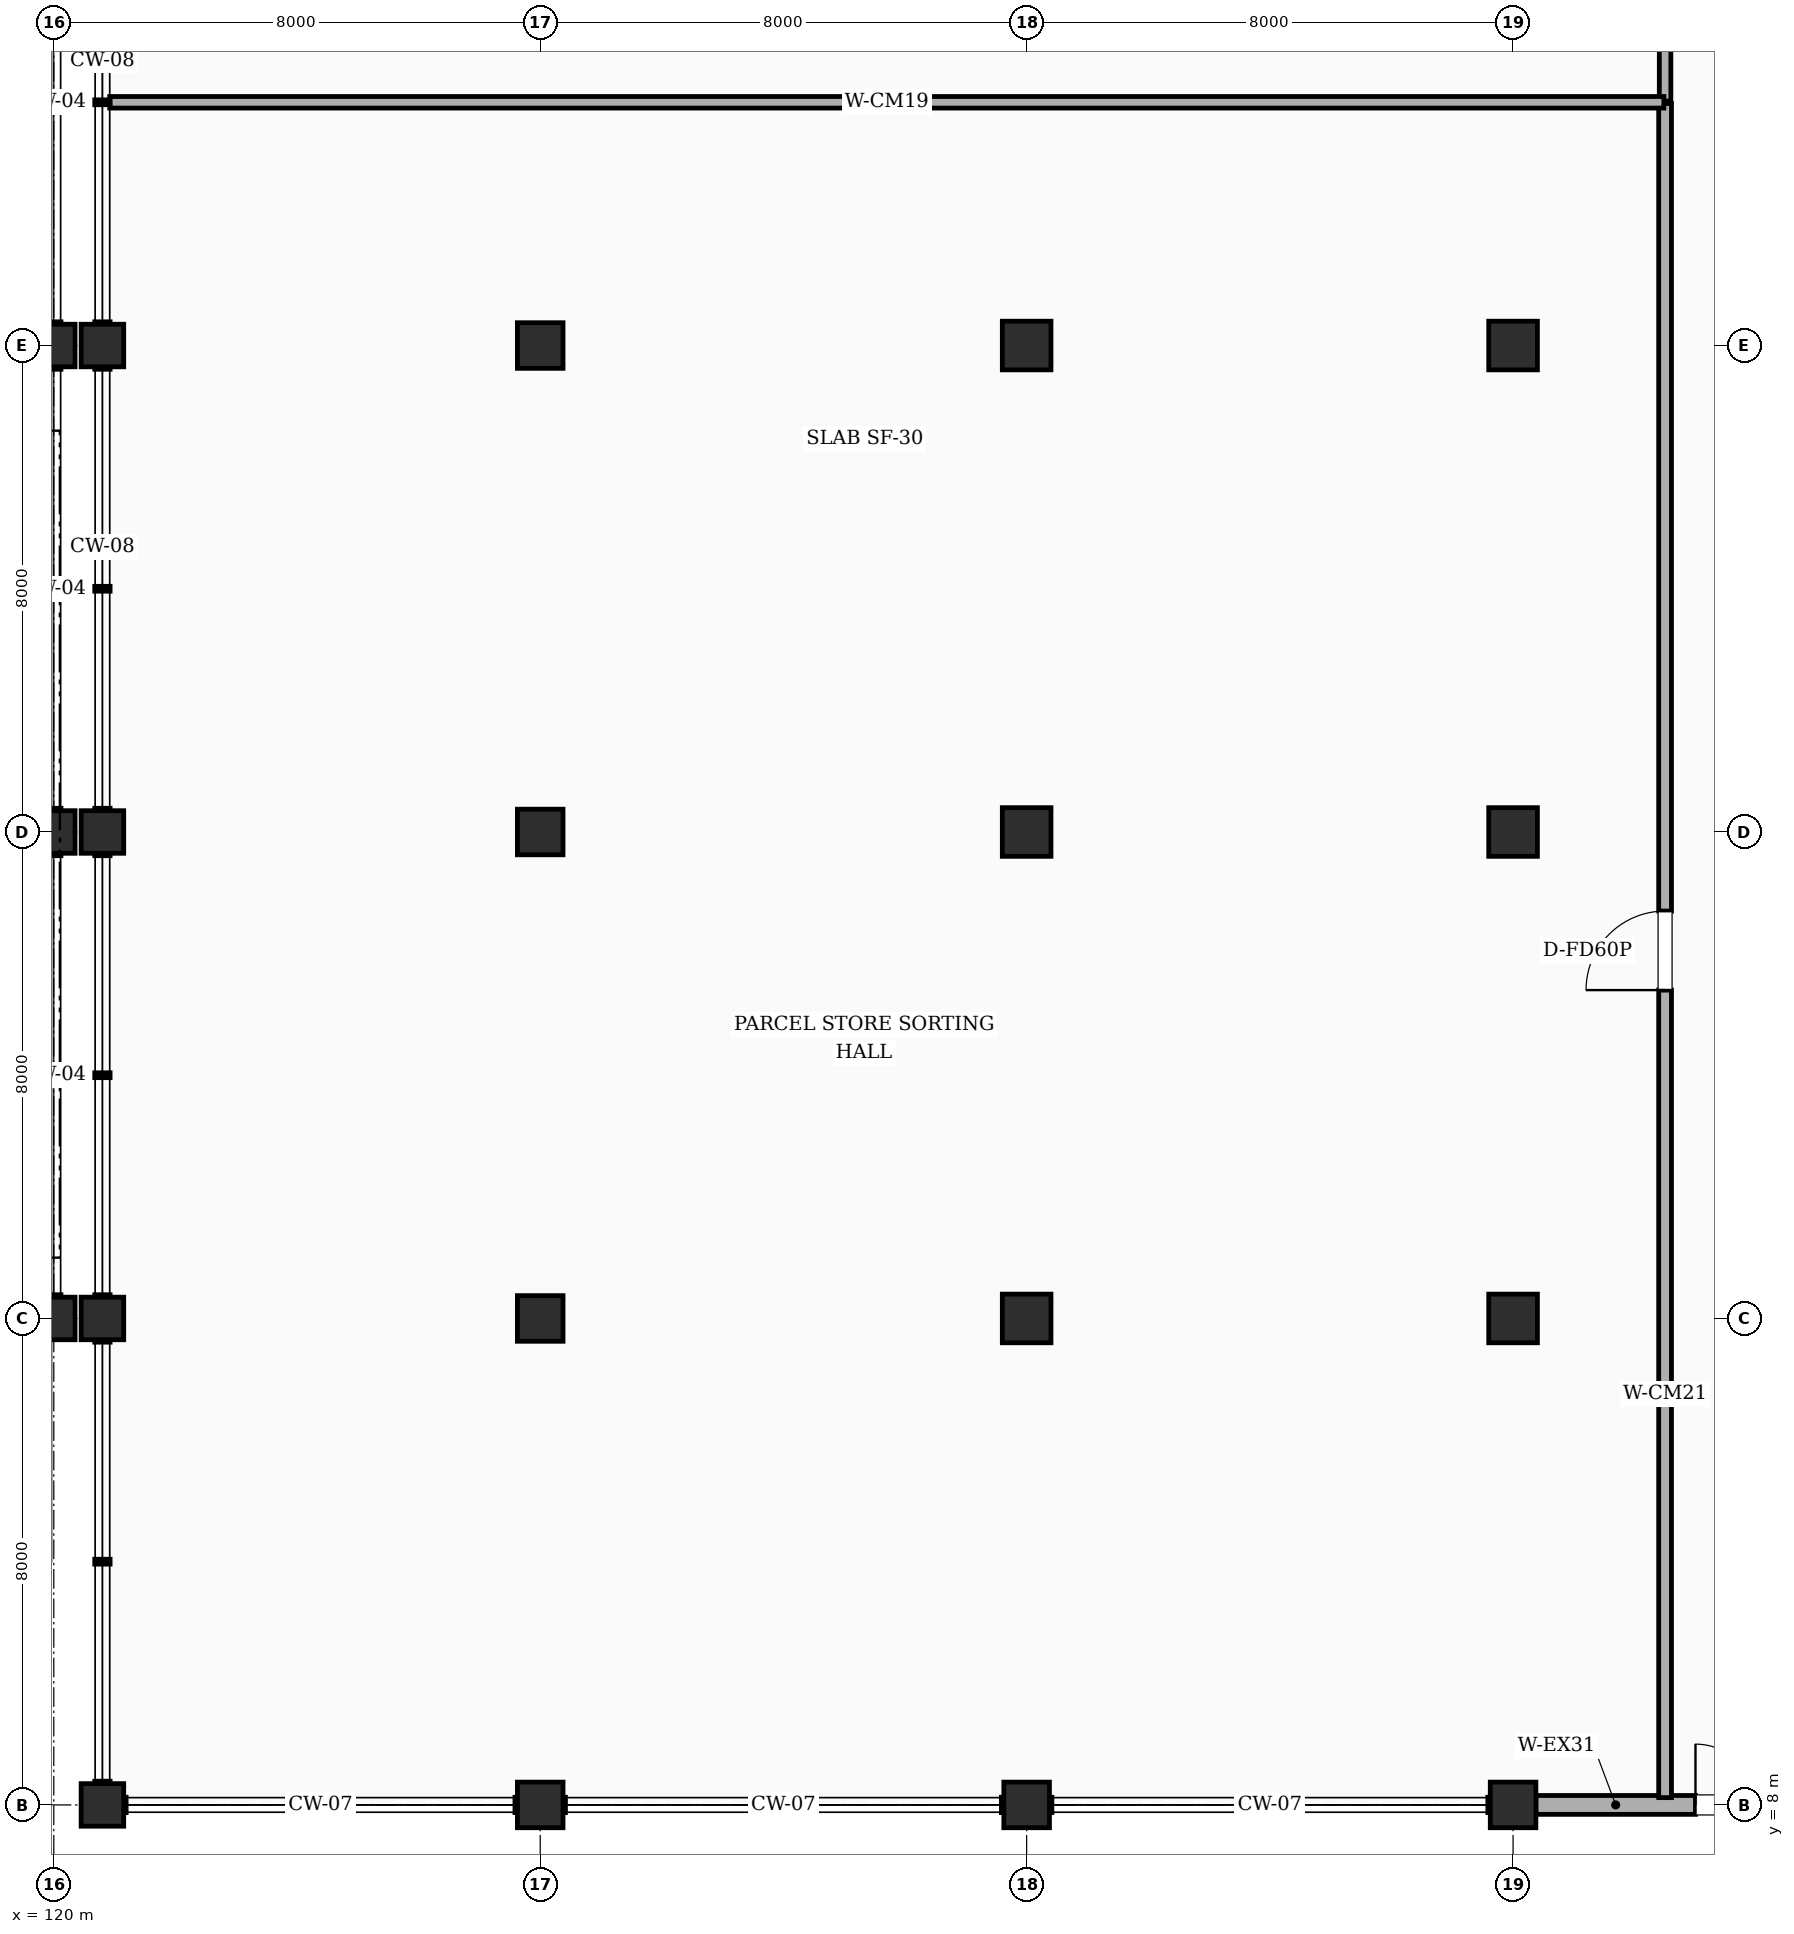
"""IFC4 building model, lengths in metres.
Left out: names, types, materials, properties, quantities, classifications, styles, units other than length and angle.
Written with IfcOpenShell. Run it as: python <this file> out.ifc"""

import sys

from ifc_helpers import new_model, si_unit, direction, frame, frame_2d, origin, origin_2d, place, context, subcontext, project, spatial, rectangle, extrude, element, fill, save


model = new_model("IFC4")
c1 = context("Model", 3, precision=1e-05, world=origin(), true_north=direction((0.0, 1.0)))
c2 = subcontext(c1, "Body", "Model", "MODEL_VIEW")
j1 = project(units=[si_unit("LENGTHUNIT", "METRE"), si_unit("PLANEANGLEUNIT", "RADIAN")], contexts=[c1])
p1 = place(None, origin())
s1 = spatial("IfcSite", under=j1, at=p1, CompositionType="ELEMENT")
p2 = place(p1, origin())
s2 = spatial("IfcBuilding", under=s1, at=p2, CompositionType="ELEMENT")
p3 = place(p2, origin())
s3 = spatial("IfcBuildingStorey", under=s2, at=p3, CompositionType="ELEMENT", Elevation=0.0)
for number, where, z_axis, x_axis in (
    (1, (120.0, 16.0, 0.0), (0.0, 0.0, 1.0), (1.0, 0.0, 0.0)),
    (2, (120.0, 24.0, 0.0), (0.0, 0.0, 1.0), (1.0, 0.0, 0.0)),
    (3, (120.0, 32.0, 0.0), (0.0, 0.0, 1.0), (1.0, 0.0, 0.0)),
    (4, (120.8, 8.0, 0.0), (0.0, 0.0, 1.0), (1.0, 0.0, 0.0)),
    (5, (120.8, 16.0, 0.0), (0.0, 0.0, 1.0), (1.0, 0.0, 0.0)),
    (6, (120.8, 24.0, 0.0), (0.0, 0.0, 1.0), (1.0, 0.0, 0.0)),
    (7, (120.8, 32.0, 0.0), (0.0, 0.0, 1.0), (1.0, 0.0, 0.0)),
):
    element("IfcColumn", number, at=place(p3, frame(where, z_axis=z_axis, x_axis=x_axis)), inside=s3, PredefinedType="COLUMN", context=c2, shape_type="SweptSolid", body=[
        extrude(rectangle(XDim=0.7, YDim=0.7, at=origin_2d()), origin(), (0.0, 0.0, 1.0), 5.4),
    ])
for number, where, z_axis, x_axis in (
    (8, (128.0, 8.0, 0.0), (0.0, 0.0, 1.0), (1.0, 0.0, 0.0)),
    (9, (128.0, 16.0, 0.0), (0.0, 0.0, 1.0), (1.0, 0.0, 0.0)),
    (10, (128.0, 24.0, 0.0), (0.0, 0.0, 1.0), (1.0, 0.0, 0.0)),
    (11, (128.0, 32.0, 0.0), (0.0, 0.0, 1.0), (1.0, 0.0, 0.0)),
    (12, (136.0, 8.0, 0.0), (0.0, 0.0, 1.0), (1.0, 0.0, 0.0)),
):
    element("IfcColumn", number, at=place(p3, frame(where, z_axis=z_axis, x_axis=x_axis)), inside=s3, PredefinedType="COLUMN", context=c2, shape_type="SweptSolid", body=[
        extrude(rectangle(XDim=0.75, YDim=0.75, at=origin_2d()), origin(), (0.0, 0.0, 1.0), 5.4),
    ])
for number, where, z_axis, x_axis in (
    (13, (136.0, 16.0, 0.0), (0.0, 0.0, 1.0), (1.0, 0.0, 0.0)),
    (14, (136.0, 24.0, 0.0), (0.0, 0.0, 1.0), (1.0, 0.0, 0.0)),
    (15, (136.0, 32.0, 0.0), (0.0, 0.0, 1.0), (1.0, 0.0, 0.0)),
):
    element("IfcColumn", number, at=place(p3, frame(where, z_axis=z_axis, x_axis=x_axis)), inside=s3, PredefinedType="COLUMN", context=c2, shape_type="SweptSolid", body=[
        extrude(rectangle(XDim=0.8, YDim=0.8, at=origin_2d()), origin(), (0.0, 0.0, 1.0), 5.4),
    ])
p4 = place(p3, frame((144.0, 8.0, 0.0), z_axis=(0.0, 0.0, 1.0), x_axis=(1.0, 0.0, 0.0)))
e16 = element("IfcColumn", 16, at=p4, inside=s3, PredefinedType="COLUMN", context=c2, shape_type="SweptSolid", body=[
    extrude(rectangle(XDim=0.75, YDim=0.75, at=origin_2d()), origin(), (0.0, 0.0, 1.0), 5.4),
])
for number, where, z_axis, x_axis in (
    (17, (144.0, 16.0, 0.0), (0.0, 0.0, 1.0), (1.0, 0.0, 0.0)),
    (18, (144.0, 24.0, 0.0), (0.0, 0.0, 1.0), (1.0, 0.0, 0.0)),
    (19, (144.0, 32.0, 0.0), (0.0, 0.0, 1.0), (1.0, 0.0, 0.0)),
):
    element("IfcColumn", number, at=place(p3, frame(where, z_axis=z_axis, x_axis=x_axis)), inside=s3, PredefinedType="COLUMN", context=c2, shape_type="SweptSolid", body=[
        extrude(rectangle(XDim=0.8, YDim=0.8, at=origin_2d()), origin(), (0.0, 0.0, 1.0), 5.4),
    ])
p5 = place(p3, frame((144.375, 8.0, 0.0), z_axis=(0.0, 0.0, 1.0), x_axis=(1.0, 0.0, 0.0)))
e20 = element("IfcWall", 20, at=p5, inside=s3, PredefinedType="STANDARD", context=c2, shape_type="SweptSolid", body=[
    extrude(rectangle(XDim=7.25, YDim=0.31, at=frame_2d((3.625, 0.0))), origin(), (0.0, 0.0, 1.0), 5.1),
])
p6 = place(p5, frame((2.625, 0.0, 0.0)))
e21 = element("IfcOpeningElement", 21, at=p6, cuts=e20, PredefinedType="OPENING", context=c2, shape_type="SweptSolid", body=[
    extrude(rectangle(XDim=2.0, YDim=2.4, at=frame_2d((1.0, 1.2))), frame((0.0, 0.165, 0.0), z_axis=(0.0, -1.0, 0.0), x_axis=(1.0, 0.0, 0.0)), (0.0, 0.0, 1.0), 0.33),
])
p7 = place(p3, frame((146.5, 8.12, 0.0), z_axis=(0.0, 0.0, 1.0), x_axis=(0.0, 1.0, 0.0)))
e22 = element("IfcWall", 22, at=p7, inside=s3, PredefinedType="SOLIDWALL", context=c2, shape_type="SweptSolid", body=[
    extrude(rectangle(XDim=27.86, YDim=0.21, at=frame_2d((13.93, 0.0))), origin(), (0.0, 0.0, 1.0), 5.1),
])
p8 = place(p7, frame((13.28, 0.0, 0.0)))
e23 = element("IfcOpeningElement", 23, at=p8, cuts=e22, PredefinedType="OPENING", context=c2, shape_type="SweptSolid", body=[
    extrude(rectangle(XDim=1.3, YDim=2.2, at=frame_2d((0.65, 1.1))), frame((0.0, 0.115, 0.0), z_axis=(0.0, -1.0, 0.0), x_axis=(1.0, 0.0, 0.0)), (0.0, 0.0, 1.0), 0.23),
])
p9 = place(p3, frame((146.5, 36.02, 0.0), z_axis=(0.0, 0.0, 1.0), x_axis=(0.0, 1.0, 0.0)))
e24 = element("IfcWall", 24, at=p9, inside=s3, PredefinedType="SOLIDWALL", context=c2, shape_type="SweptSolid", body=[
    extrude(rectangle(XDim=15.96, YDim=0.19, at=frame_2d((7.98, 0.0))), origin(), (0.0, 0.0, 1.0), 5.1),
])
p10 = place(p9, frame((7.38, 0.0, 0.0)))
e25 = element("IfcOpeningElement", 25, at=p10, cuts=e24, PredefinedType="OPENING", context=c2, shape_type="SweptSolid", body=[
    extrude(rectangle(XDim=1.2, YDim=2.15, at=frame_2d((0.6, 1.075))), frame((0.0, 0.105, 0.0), z_axis=(0.0, -1.0, 0.0), x_axis=(1.0, 0.0, 0.0)), (0.0, 0.0, 1.0), 0.21),
])
p11 = place(p3, frame((120.92, 36.0, 0.0), z_axis=(0.0, 0.0, 1.0), x_axis=(1.0, 0.0, 0.0)))
e26 = element("IfcWall", 26, at=p11, inside=s3, PredefinedType="SOLIDWALL", context=c2, shape_type="SweptSolid", body=[
    extrude(rectangle(XDim=25.56, YDim=0.19, at=frame_2d((12.78, 0.0))), origin(), (0.0, 0.0, 1.0), 4.27),
])
p12 = place(p6, frame((2.0, 0.0, 0.0), z_axis=(0.0, 0.0, 1.0), x_axis=(-1.0, 0.0, 0.0)))
e27 = element("IfcDoor", 27, at=p12, inside=s3, OperationType="DOUBLE_DOOR_SINGLE_SWING", PredefinedType="DOOR", context=c2, shape_type="SweptSolid", body=[
    extrude(rectangle(XDim=2.0, YDim=2.4, at=frame_2d((-1.0, 1.2))), frame((0.0, -0.025, 0.0), z_axis=(0.0, 1.0, 0.0), x_axis=(-1.0, 0.0, 0.0)), (0.0, 0.0, 1.0), 0.05),
])
fill(e21, e27)
p13 = place(p8, origin())
e28 = element("IfcDoor", 28, at=p13, inside=s3, OperationType="SINGLE_SWING_LEFT", PredefinedType="DOOR", context=c2, shape_type="SweptSolid", body=[
    extrude(rectangle(XDim=1.3, YDim=2.2, at=frame_2d((0.65, 1.1))), frame((0.0, 0.025, 0.0), z_axis=(0.0, -1.0, 0.0), x_axis=(1.0, 0.0, 0.0)), (0.0, 0.0, 1.0), 0.05),
])
fill(e23, e28)
save(model, sys.argv[1])
